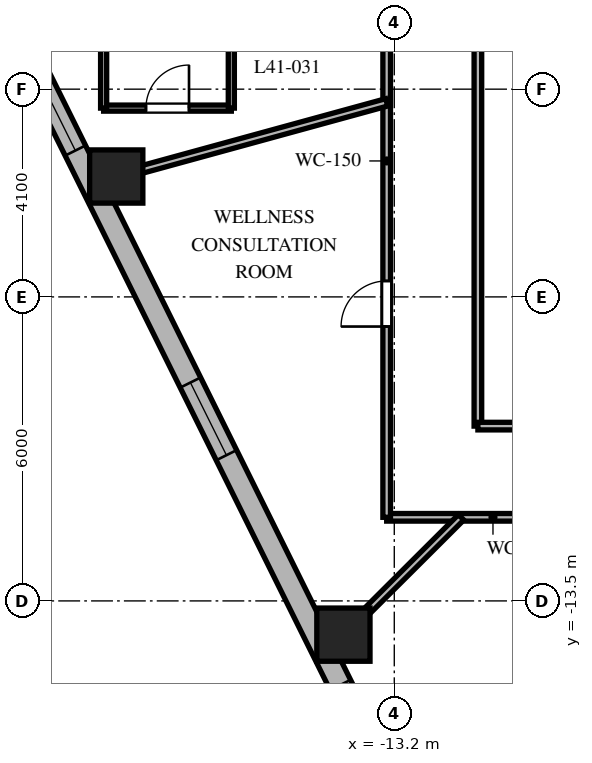
"""IFC4 building model, lengths in metres.
Left out: names, types, materials, properties, quantities, classifications, styles, units other than length and angle.
Written with IfcOpenShell. Run it as: python <this file> out.ifc"""

import sys

from ifc_helpers import new_model, si_unit, direction, frame, frame_2d, origin, origin_2d, place, context, subcontext, project, spatial, rectangle, extrude, element, fill, save


model = new_model("IFC4")
c1 = context("Model", 3, precision=1e-05, world=origin(), true_north=direction((0.0, 1.0)))
c2 = subcontext(c1, "Body", "Model", "MODEL_VIEW")
j1 = project(units=[si_unit("LENGTHUNIT", "METRE"), si_unit("PLANEANGLEUNIT", "RADIAN")], contexts=[c1])
p1 = place(None, origin())
s1 = spatial("IfcSite", under=j1, at=p1, CompositionType="ELEMENT")
p2 = place(p1, origin())
s2 = spatial("IfcBuilding", under=s1, at=p2, CompositionType="ELEMENT")
p3 = place(p2, frame((0.0, 0.0, 166.5)))
s3 = spatial("IfcBuildingStorey", under=s2, at=p3, CompositionType="ELEMENT", Elevation=166.5)
for number, where, z_axis, x_axis in (
    (1, (-18.687, -5.124, 0.0), (0.0, 0.0, 1.0), (1.0, 0.0, 0.0)),
    (2, (-14.204, -14.166, 0.0), (0.0, 0.0, 1.0), (1.0, 0.0, 0.0)),
):
    element("IfcColumn", number, at=place(p3, frame(where, z_axis=z_axis, x_axis=x_axis)), inside=s3, PredefinedType="COLUMN", context=c2, shape_type="SweptSolid", body=[
        extrude(rectangle(XDim=1.05, YDim=1.05, at=origin_2d()), origin(), (0.0, 0.0, 1.0), 3.7),
    ])
p4 = place(p3, frame((-20.618, -2.344, 0.0), z_axis=(0.0, 0.0, 1.0), x_axis=(0.444243691097, -0.895905990002, 0.0)))
e3 = element("IfcWall", 3, at=p4, inside=s3, PredefinedType="SOLIDWALL", context=c2, shape_type="SweptSolid", body=[
    extrude(rectangle(XDim=16.784, YDim=0.45, at=frame_2d((8.392, 0.0))), origin(), (0.0, 0.0, 1.0), 3.38),
])
p5 = place(p4, frame((0.931, 0.0, 0.8)))
e4 = element("IfcOpeningElement", 4, at=p5, cuts=e3, PredefinedType="OPENING", context=c2, shape_type="SweptSolid", body=[
    extrude(rectangle(XDim=1.6, YDim=1.75, at=frame_2d((0.8, 0.875))), frame((0.0, 0.235, 0.0), z_axis=(0.0, -1.0, 0.0), x_axis=(1.0, 0.0, 0.0)), (0.0, 0.0, 1.0), 0.47),
])
p6 = place(p4, frame((7.642, 0.0, 0.8)))
e5 = element("IfcOpeningElement", 5, at=p6, cuts=e3, PredefinedType="OPENING", context=c2, shape_type="SweptSolid", body=[
    extrude(rectangle(XDim=1.6, YDim=1.75, at=frame_2d((0.8, 0.875))), frame((0.0, 0.235, 0.0), z_axis=(0.0, -1.0, 0.0), x_axis=(1.0, 0.0, 0.0)), (0.0, 0.0, 1.0), 0.47),
])
p7 = place(p4, frame((14.303, 0.0, 0.8)))
e6 = element("IfcOpeningElement", 6, at=p7, cuts=e3, PredefinedType="OPENING", context=c2, shape_type="SweptSolid", body=[
    extrude(rectangle(XDim=1.6, YDim=1.75, at=frame_2d((0.8, 0.875))), frame((0.0, 0.235, 0.0), z_axis=(0.0, -1.0, 0.0), x_axis=(1.0, 0.0, 0.0)), (0.0, 0.0, 1.0), 0.47),
])
p8 = place(p3, frame((13.35, -11.85, 0.0), z_axis=(0.0, 0.0, 1.0), x_axis=(-1.0, 0.0, 0.0)))
e7 = element("IfcWall", 7, at=p8, inside=s3, PredefinedType="PARTITIONING", context=c2, shape_type="SweptSolid", body=[
    extrude(rectangle(XDim=26.7, YDim=0.15, at=frame_2d((13.35, 0.0))), origin(), (0.0, 0.0, 1.0), 2.82),
])
p9 = place(p8, frame((20.682, 0.0, 0.0)))
e8 = element("IfcOpeningElement", 8, at=p9, cuts=e7, PredefinedType="OPENING", context=c2, shape_type="SweptSolid", body=[
    extrude(rectangle(XDim=0.95, YDim=2.03, at=frame_2d((0.475, 1.015))), frame((0.0, 0.085, 0.0), z_axis=(0.0, -1.0, 0.0), x_axis=(1.0, 0.0, 0.0)), (0.0, 0.0, 1.0), 0.17),
])
p10 = place(p8, frame((14.708, 0.0, 0.0)))
e9 = element("IfcOpeningElement", 9, at=p10, cuts=e7, PredefinedType="OPENING", context=c2, shape_type="SweptSolid", body=[
    extrude(rectangle(XDim=0.95, YDim=2.03, at=frame_2d((0.475, 1.015))), frame((0.0, 0.085, 0.0), z_axis=(0.0, -1.0, 0.0), x_axis=(1.0, 0.0, 0.0)), (0.0, 0.0, 1.0), 0.17),
])
p11 = place(p8, frame((10.553, 0.0, 0.0)))
e10 = element("IfcOpeningElement", 10, at=p11, cuts=e7, PredefinedType="OPENING", context=c2, shape_type="SweptSolid", body=[
    extrude(rectangle(XDim=0.95, YDim=2.03, at=frame_2d((0.475, 1.015))), frame((0.0, 0.085, 0.0), z_axis=(0.0, -1.0, 0.0), x_axis=(1.0, 0.0, 0.0)), (0.0, 0.0, 1.0), 0.17),
])
p12 = place(p8, frame((6.353, 0.0, 0.0)))
e11 = element("IfcOpeningElement", 11, at=p12, cuts=e7, PredefinedType="OPENING", context=c2, shape_type="SweptSolid", body=[
    extrude(rectangle(XDim=0.9, YDim=2.03, at=frame_2d((0.45, 1.015))), frame((0.0, 0.085, 0.0), z_axis=(0.0, -1.0, 0.0), x_axis=(1.0, 0.0, 0.0)), (0.0, 0.0, 1.0), 0.17),
])
p13 = place(p8, frame((2.15, 0.0, 0.0)))
e12 = element("IfcOpeningElement", 12, at=p13, cuts=e7, PredefinedType="OPENING", context=c2, shape_type="SweptSolid", body=[
    extrude(rectangle(XDim=0.9, YDim=2.03, at=frame_2d((0.45, 1.015))), frame((0.0, 0.085, 0.0), z_axis=(0.0, -1.0, 0.0), x_axis=(1.0, 0.0, 0.0)), (0.0, 0.0, 1.0), 0.17),
])
p14 = place(p3, frame((-13.35, -11.85, 0.0), z_axis=(0.0, 0.0, 1.0), x_axis=(0.0, 1.0, 0.0)))
e13 = element("IfcWall", 13, at=p14, inside=s3, PredefinedType="PARTITIONING", context=c2, shape_type="SweptSolid", body=[
    extrude(rectangle(XDim=23.7, YDim=0.15, at=frame_2d((11.85, 0.0))), origin(), (0.0, 0.0, 1.0), 2.82),
])
p15 = place(p14, frame((20.136, 0.0, 0.0)))
e14 = element("IfcOpeningElement", 14, at=p15, cuts=e13, PredefinedType="OPENING", context=c2, shape_type="SweptSolid", body=[
    extrude(rectangle(XDim=0.9, YDim=2.03, at=frame_2d((0.45, 1.015))), frame((0.0, 0.085, 0.0), z_axis=(0.0, -1.0, 0.0), x_axis=(1.0, 0.0, 0.0)), (0.0, 0.0, 1.0), 0.17),
])
p16 = place(p14, frame((15.551, 0.0, 0.0)))
e15 = element("IfcOpeningElement", 15, at=p16, cuts=e13, PredefinedType="OPENING", context=c2, shape_type="SweptSolid", body=[
    extrude(rectangle(XDim=0.9, YDim=2.03, at=frame_2d((0.45, 1.015))), frame((0.0, 0.085, 0.0), z_axis=(0.0, -1.0, 0.0), x_axis=(1.0, 0.0, 0.0)), (0.0, 0.0, 1.0), 0.17),
])
p17 = place(p14, frame((12.494, 0.0, 0.0)))
e16 = element("IfcOpeningElement", 16, at=p17, cuts=e13, PredefinedType="OPENING", context=c2, shape_type="SweptSolid", body=[
    extrude(rectangle(XDim=0.9, YDim=2.03, at=frame_2d((0.45, 1.015))), frame((0.0, 0.085, 0.0), z_axis=(0.0, -1.0, 0.0), x_axis=(1.0, 0.0, 0.0)), (0.0, 0.0, 1.0), 0.17),
])
p18 = place(p14, frame((9.424, 0.0, 0.0)))
e17 = element("IfcOpeningElement", 17, at=p18, cuts=e13, PredefinedType="OPENING", context=c2, shape_type="SweptSolid", body=[
    extrude(rectangle(XDim=0.95, YDim=2.03, at=frame_2d((0.475, 1.015))), frame((0.0, 0.085, 0.0), z_axis=(0.0, -1.0, 0.0), x_axis=(1.0, 0.0, 0.0)), (0.0, 0.0, 1.0), 0.17),
])
p19 = place(p14, frame((3.765, 0.0, 0.0)))
e18 = element("IfcOpeningElement", 18, at=p19, cuts=e13, PredefinedType="OPENING", context=c2, shape_type="SweptSolid", body=[
    extrude(rectangle(XDim=0.9, YDim=2.03, at=frame_2d((0.45, 1.015))), frame((0.0, 0.085, 0.0), z_axis=(0.0, -1.0, 0.0), x_axis=(1.0, 0.0, 0.0)), (0.0, 0.0, 1.0), 0.17),
])
p20 = place(p3, frame((-11.55, 2.7, 0.0), z_axis=(0.0, 0.0, 1.0), x_axis=(0.0, -1.0, 0.0)))
e19 = element("IfcWall", 19, at=p20, inside=s3, PredefinedType="PARTITIONING", context=c2, shape_type="SweptSolid", body=[
    extrude(rectangle(XDim=12.75, YDim=0.15, at=frame_2d((6.375, 0.0))), origin(), (0.0, 0.0, 1.0), 2.82),
])
p21 = place(p3, frame((-11.55, -10.05, 0.0), z_axis=(0.0, 0.0, 1.0), x_axis=(1.0, 0.0, 0.0)))
e20 = element("IfcWall", 20, at=p21, inside=s3, PredefinedType="PARTITIONING", context=c2, shape_type="SweptSolid", body=[
    extrude(rectangle(XDim=11.55, YDim=0.15, at=frame_2d((5.775, 0.0))), origin(), (0.0, 0.0, 1.0), 2.82),
])
p22 = place(p3, frame((-13.35, -3.661, 0.0), z_axis=(0.0, 0.0, 1.0), x_axis=(-0.964397145454, -0.264458211898, 0.0)))
e21 = element("IfcWall", 21, at=p22, inside=s3, PredefinedType="PARTITIONING", context=c2, shape_type="SweptSolid", body=[
    extrude(rectangle(XDim=6.039, YDim=0.15, at=frame_2d((3.019, 0.0))), origin(), (0.0, 0.0, 1.0), 2.62),
])
p23 = place(p3, frame((-11.882, -11.85, 0.0), z_axis=(0.0, 0.0, 1.0), x_axis=(-0.708037373639, -0.706174962407, 0.0)))
e22 = element("IfcWall", 22, at=p23, inside=s3, PredefinedType="PARTITIONING", context=c2, shape_type="SweptSolid", body=[
    extrude(rectangle(XDim=3.802, YDim=0.15, at=frame_2d((1.901, 0.0))), origin(), (0.0, 0.0, 1.0), 2.62),
])
p24 = place(p3, frame((-18.936, -3.774, 0.0), z_axis=(0.0, 0.0, 1.0), x_axis=(1.0, 0.0, 0.0)))
e23 = element("IfcWall", 23, at=p24, inside=s3, PredefinedType="PARTITIONING", context=c2, shape_type="SweptSolid", body=[
    extrude(rectangle(XDim=2.52, YDim=0.12, at=frame_2d((1.26, 0.0))), origin(), (0.0, 0.0, 1.0), 2.62),
])
p25 = place(p24, frame((0.835, 0.0, 0.0)))
e24 = element("IfcOpeningElement", 24, at=p25, cuts=e23, PredefinedType="OPENING", context=c2, shape_type="SweptSolid", body=[
    extrude(rectangle(XDim=0.85, YDim=2.03, at=frame_2d((0.425, 1.015))), frame((0.0, 0.07, 0.0), z_axis=(0.0, -1.0, 0.0), x_axis=(1.0, 0.0, 0.0)), (0.0, 0.0, 1.0), 0.14),
])
p26 = place(p3, frame((-16.416, -3.774, 0.0), z_axis=(0.0, 0.0, 1.0), x_axis=(0.0, 1.0, 0.0)))
e25 = element("IfcWall", 25, at=p26, inside=s3, PredefinedType="PARTITIONING", context=c2, shape_type="SweptSolid", body=[
    extrude(rectangle(XDim=2.68, YDim=0.12, at=frame_2d((1.34, 0.0))), origin(), (0.0, 0.0, 1.0), 3.38),
])
p27 = place(p3, frame((-18.936, -1.094, 0.0), z_axis=(0.0, 0.0, 1.0), x_axis=(0.0, -1.0, 0.0)))
e26 = element("IfcWall", 26, at=p27, inside=s3, PredefinedType="PARTITIONING", context=c2, shape_type="SweptSolid", body=[
    extrude(rectangle(XDim=2.68, YDim=0.12, at=frame_2d((1.34, 0.0))), origin(), (0.0, 0.0, 1.0), 2.62),
])
p28 = place(p5, origin())
e27 = element("IfcWindow", 27, at=p28, inside=s3, PartitioningType="SINGLE_PANEL", PredefinedType="WINDOW", context=c2, shape_type="SweptSolid", body=[
    extrude(rectangle(XDim=1.6, YDim=1.75, at=frame_2d((0.8, 0.875))), frame((0.0, 0.03, 0.0), z_axis=(0.0, -1.0, 0.0), x_axis=(1.0, 0.0, 0.0)), (0.0, 0.0, 1.0), 0.06),
])
fill(e4, e27)
p29 = place(p6, origin())
e28 = element("IfcWindow", 28, at=p29, inside=s3, PartitioningType="SINGLE_PANEL", PredefinedType="WINDOW", context=c2, shape_type="SweptSolid", body=[
    extrude(rectangle(XDim=1.6, YDim=1.75, at=frame_2d((0.8, 0.875))), frame((0.0, 0.03, 0.0), z_axis=(0.0, -1.0, 0.0), x_axis=(1.0, 0.0, 0.0)), (0.0, 0.0, 1.0), 0.06),
])
fill(e5, e28)
p30 = place(p25, origin())
e29 = element("IfcDoor", 29, at=p30, inside=s3, OperationType="SINGLE_SWING_RIGHT", PredefinedType="DOOR", context=c2, shape_type="SweptSolid", body=[
    extrude(rectangle(XDim=0.85, YDim=2.03, at=frame_2d((0.425, 1.015))), frame((0.0, 0.025, 0.0), z_axis=(0.0, -1.0, 0.0), x_axis=(1.0, 0.0, 0.0)), (0.0, 0.0, 1.0), 0.05),
])
fill(e24, e29)
p31 = place(p19, origin())
e30 = element("IfcDoor", 30, at=p31, inside=s3, OperationType="SINGLE_SWING_LEFT", PredefinedType="DOOR", context=c2, shape_type="SweptSolid", body=[
    extrude(rectangle(XDim=0.9, YDim=2.03, at=frame_2d((0.45, 1.015))), frame((0.0, 0.025, 0.0), z_axis=(0.0, -1.0, 0.0), x_axis=(1.0, 0.0, 0.0)), (0.0, 0.0, 1.0), 0.05),
])
fill(e18, e30)
save(model, sys.argv[1])
